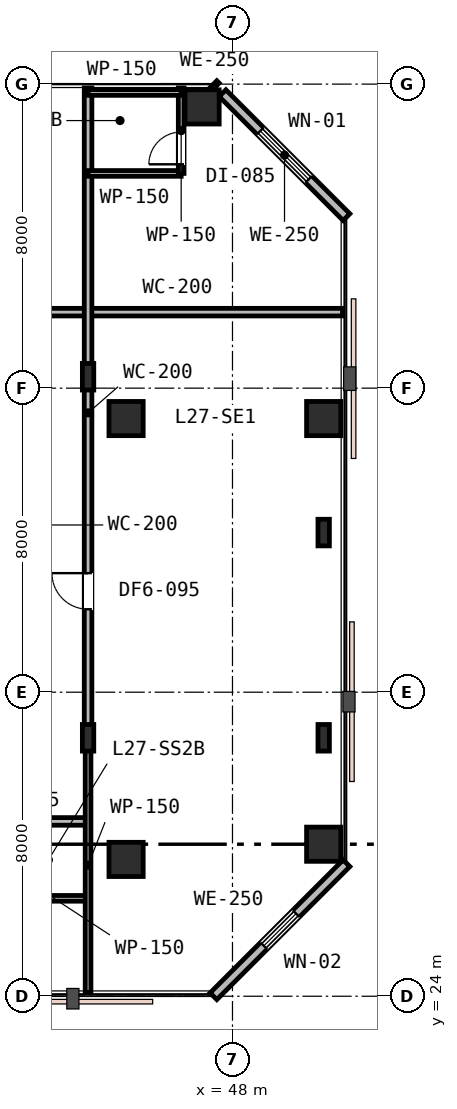
"""IFC4 building model, lengths in metres.
Left out: names, types, materials, properties, quantities, classifications, styles, units other than length and angle.
Written with IfcOpenShell. Run it as: python <this file> out.ifc"""

import sys

from ifc_helpers import new_model, si_unit, direction, frame, frame_2d, origin, origin_2d, place, context, subcontext, project, spatial, rectangle, i_section, extrude, element, fill, save


model = new_model("IFC4")
c1 = context("Model", 3, precision=1e-05, world=origin(), true_north=direction((0.0, 1.0)))
c2 = subcontext(c1, "Body", "Model", "MODEL_VIEW")
j1 = project(units=[si_unit("LENGTHUNIT", "METRE"), si_unit("PLANEANGLEUNIT", "RADIAN")], contexts=[c1])
p1 = place(None, origin())
s1 = spatial("IfcSite", under=j1, at=p1, CompositionType="ELEMENT")
p2 = place(p1, origin())
s2 = spatial("IfcBuilding", under=s1, at=p2, CompositionType="ELEMENT")
p3 = place(p2, frame((0.0, 0.0, 108.0)))
s3 = spatial("IfcBuildingStorey", under=s2, at=p3, CompositionType="ELEMENT", Elevation=108.0)
for number, where, z_axis, x_axis in (
    (1, (45.2, 27.6, 0.0), (0.0, 0.0, 1.0), (1.0, 0.0, 0.0)),
    (2, (45.2, 39.2, 0.0), (0.0, 0.0, 1.0), (1.0, 0.0, 0.0)),
    (3, (47.2, 47.4, 0.0), (0.0, 0.0, 1.0), (1.0, 0.0, 0.0)),
    (4, (50.4, 28.0, 0.0), (0.0, 0.0, 1.0), (1.0, 0.0, 0.0)),
    (5, (50.4, 39.2, 0.0), (0.0, 0.0, 1.0), (1.0, 0.0, 0.0)),
):
    element("IfcColumn", number, at=place(p3, frame(where, z_axis=z_axis, x_axis=x_axis)), inside=s3, PredefinedType="COLUMN", context=c2, shape_type="SweptSolid", body=[
        extrude(rectangle(XDim=0.9, YDim=0.9, at=origin_2d()), origin(), (0.0, 0.0, 1.0), 3.6),
    ])
for number, where, z_axis, x_axis in (
    (6, (44.2, 30.8, 0.0), (0.0, 0.0, 1.0), (1.0, 0.0, 0.0)),
    (7, (44.2, 40.3, 0.0), (0.0, 0.0, 1.0), (1.0, 0.0, 0.0)),
    (8, (50.4, 30.8, 0.0), (0.0, 0.0, 1.0), (1.0, 0.0, 0.0)),
    (9, (50.4, 36.2, 0.0), (0.0, 0.0, 1.0), (1.0, 0.0, 0.0)),
):
    element("IfcColumn", number, at=place(p3, frame(where, z_axis=z_axis, x_axis=x_axis)), inside=s3, PredefinedType="COLUMN", context=c2, shape_type="SweptSolid", body=[
        extrude(i_section(OverallWidth=0.3, OverallDepth=0.7, WebThickness=0.017, FlangeThickness=0.032, FilletRadius=0.027, at=origin_2d()), origin(), (0.0, 0.0, 1.0), 3.6),
    ])
p4 = place(p3, frame((47.5, 24.0, 0.0), z_axis=(0.0, 0.0, 1.0), x_axis=(0.707106781187, 0.707106781187, 0.0)))
e10 = element("IfcWall", 10, at=p4, inside=s3, PredefinedType="STANDARD", context=c2, shape_type="SweptSolid", body=[
    extrude(rectangle(XDim=4.95, YDim=0.25, at=frame_2d((2.475, 0.0))), origin(), (0.0, 0.0, 1.0), 3.33),
])
p5 = place(p4, frame((1.875, 0.0, 0.85)))
e11 = element("IfcOpeningElement", 11, at=p5, cuts=e10, PredefinedType="OPENING", context=c2, shape_type="SweptSolid", body=[
    extrude(rectangle(XDim=1.2, YDim=1.6, at=frame_2d((0.6, 0.8))), frame((0.0, 0.135, 0.0), z_axis=(0.0, -1.0, 0.0), x_axis=(1.0, 0.0, 0.0)), (0.0, 0.0, 1.0), 0.27),
])
p6 = place(p3, frame((51.0, 44.5, 0.0), z_axis=(0.0, 0.0, 1.0), x_axis=(-0.707106781187, 0.707106781187, 0.0)))
e12 = element("IfcWall", 12, at=p6, inside=s3, PredefinedType="STANDARD", context=c2, shape_type="SweptSolid", body=[
    extrude(rectangle(XDim=4.613, YDim=0.25, at=frame_2d((2.306, 0.0))), origin(), (0.0, 0.0, 1.0), 3.33),
])
p7 = place(p6, frame((1.406, 0.0, 0.75)))
e13 = element("IfcOpeningElement", 13, at=p7, cuts=e12, PredefinedType="OPENING", context=c2, shape_type="SweptSolid", body=[
    extrude(rectangle(XDim=1.8, YDim=1.85, at=frame_2d((0.9, 0.925))), frame((0.0, 0.135, 0.0), z_axis=(0.0, -1.0, 0.0), x_axis=(1.0, 0.0, 0.0)), (0.0, 0.0, 1.0), 0.27),
])
p8 = place(p3, frame((47.562, 47.938, 0.0), z_axis=(0.0, 0.0, 1.0), x_axis=(-0.707106781187, 0.707106781187, 0.0)))
e14 = element("IfcWall", 14, at=p8, inside=s3, PredefinedType="STANDARD", context=c2, shape_type="SweptSolid", body=[
    extrude(rectangle(XDim=0.087, YDim=0.25, at=frame_2d((0.044, 0.0))), origin(), (0.0, 0.0, 1.0), 3.33),
])
p9 = place(p3, frame((15.4, 28.6, 0.0), z_axis=(0.0, 0.0, 1.0), x_axis=(1.0, 0.0, 0.0)))
e15 = element("IfcWall", 15, at=p9, inside=s3, PredefinedType="PARTITIONING", context=c2, shape_type="SweptSolid", body=[
    extrude(rectangle(XDim=28.8, YDim=0.2, at=frame_2d((14.4, 0.0))), origin(), (0.0, 0.0, 1.0), 2.87),
])
p10 = place(p9, frame((12.41, 0.0, 0.0)))
e16 = element("IfcOpeningElement", 16, at=p10, cuts=e15, PredefinedType="OPENING", context=c2, shape_type="SweptSolid", body=[
    extrude(rectangle(XDim=0.95, YDim=2.15, at=frame_2d((0.475, 1.075))), frame((0.0, 0.11, 0.0), z_axis=(0.0, -1.0, 0.0), x_axis=(1.0, 0.0, 0.0)), (0.0, 0.0, 1.0), 0.22),
])
p11 = place(p9, frame((22.68, 0.0, 0.0)))
e17 = element("IfcOpeningElement", 17, at=p11, cuts=e15, PredefinedType="OPENING", context=c2, shape_type="SweptSolid", body=[
    extrude(rectangle(XDim=0.95, YDim=2.15, at=frame_2d((0.475, 1.075))), frame((0.0, 0.11, 0.0), z_axis=(0.0, -1.0, 0.0), x_axis=(1.0, 0.0, 0.0)), (0.0, 0.0, 1.0), 0.22),
])
p12 = place(p3, frame((42.2, 42.0, 0.0), z_axis=(0.0, 0.0, 1.0), x_axis=(1.0, 0.0, 0.0)))
e18 = element("IfcWall", 18, at=p12, inside=s3, PredefinedType="PARTITIONING", context=c2, shape_type="SweptSolid", body=[
    extrude(rectangle(XDim=8.7, YDim=0.2, at=frame_2d((4.35, 0.0))), origin(), (0.0, 0.0, 1.0), 3.33),
])
p13 = place(p3, frame((41.75, 26.576, 0.0), z_axis=(0.0, 0.0, 1.0), x_axis=(1.0, 0.0, 0.0)))
e19 = element("IfcWall", 19, at=p13, inside=s3, PredefinedType="PARTITIONING", context=c2, shape_type="SweptSolid", body=[
    extrude(rectangle(XDim=2.45, YDim=0.15, at=frame_2d((1.225, 0.0))), origin(), (0.0, 0.0, 1.0), 3.33),
])
p14 = place(p3, frame((44.2, 30.8, 0.0), z_axis=(0.0, 0.0, 1.0), x_axis=(0.0, -1.0, 0.0)))
e20 = element("IfcWall", 20, at=p14, inside=s3, PredefinedType="PARTITIONING", context=c2, shape_type="SweptSolid", body=[
    extrude(rectangle(XDim=6.7, YDim=0.15, at=frame_2d((3.35, 0.0))), origin(), (0.0, 0.0, 1.0), 2.87),
])
p15 = place(p3, frame((44.2, 30.8, 0.0), z_axis=(0.0, 0.0, 1.0), x_axis=(0.0, 1.0, 0.0)))
e21 = element("IfcWall", 21, at=p15, inside=s3, PredefinedType="PARTITIONING", context=c2, shape_type="SweptSolid", body=[
    extrude(rectangle(XDim=17.1, YDim=0.2, at=frame_2d((8.55, 0.0))), origin(), (0.0, 0.0, 1.0), 2.87),
])
p16 = place(p15, frame((3.382, 0.0, 0.0)))
e22 = element("IfcOpeningElement", 22, at=p16, cuts=e21, PredefinedType="OPENING", context=c2, shape_type="SweptSolid", body=[
    extrude(rectangle(XDim=0.95, YDim=2.15, at=frame_2d((0.475, 1.075))), frame((0.0, 0.11, 0.0), z_axis=(0.0, -1.0, 0.0), x_axis=(1.0, 0.0, 0.0)), (0.0, 0.0, 1.0), 0.22),
])
p17 = place(p3, frame((44.2, 45.65, 0.0), z_axis=(0.0, 0.0, 1.0), x_axis=(1.0, 0.0, 0.0)))
e23 = element("IfcWall", 23, at=p17, inside=s3, PredefinedType="PARTITIONING", context=c2, shape_type="SweptSolid", body=[
    extrude(rectangle(XDim=2.45, YDim=0.15, at=frame_2d((1.225, 0.0))), origin(), (0.0, 0.0, 1.0), 3.33),
])
p18 = place(p3, frame((46.65, 45.65, 0.0), z_axis=(0.0, 0.0, 1.0), x_axis=(0.0, 1.0, 0.0)))
e24 = element("IfcWall", 24, at=p18, inside=s3, PredefinedType="PARTITIONING", context=c2, shape_type="SweptSolid", body=[
    extrude(rectangle(XDim=2.25, YDim=0.15, at=frame_2d((1.125, 0.0))), origin(), (0.0, 0.0, 1.0), 2.96),
])
p19 = place(p18, frame((0.24, 0.0, 0.0)))
e25 = element("IfcOpeningElement", 25, at=p19, cuts=e24, PredefinedType="OPENING", context=c2, shape_type="SweptSolid", body=[
    extrude(rectangle(XDim=0.85, YDim=2.15, at=frame_2d((0.425, 1.075))), frame((0.0, 0.085, 0.0), z_axis=(0.0, -1.0, 0.0), x_axis=(1.0, 0.0, 0.0)), (0.0, 0.0, 1.0), 0.17),
])
p20 = place(p3, frame((44.2, 47.78, 0.0), z_axis=(0.0, 0.0, 1.0), x_axis=(1.0, 0.0, 0.0)))
e26 = element("IfcWall", 26, at=p20, inside=s3, PredefinedType="PARTITIONING", context=c2, shape_type="SweptSolid", body=[
    extrude(rectangle(XDim=2.45, YDim=0.15, at=frame_2d((1.225, 0.0))), origin(), (0.0, 0.0, 1.0), 2.96),
])
p21 = place(p5, origin())
e27 = element("IfcWindow", 27, at=p21, inside=s3, PartitioningType="SINGLE_PANEL", PredefinedType="WINDOW", context=c2, shape_type="SweptSolid", body=[
    extrude(rectangle(XDim=1.2, YDim=1.6, at=frame_2d((0.6, 0.8))), frame((0.0, 0.03, 0.0), z_axis=(0.0, -1.0, 0.0), x_axis=(1.0, 0.0, 0.0)), (0.0, 0.0, 1.0), 0.06),
])
fill(e11, e27)
p22 = place(p7, origin())
e28 = element("IfcWindow", 28, at=p22, inside=s3, PartitioningType="SINGLE_PANEL", PredefinedType="WINDOW", context=c2, shape_type="SweptSolid", body=[
    extrude(rectangle(XDim=1.8, YDim=1.85, at=frame_2d((0.9, 0.925))), frame((0.0, 0.03, 0.0), z_axis=(0.0, -1.0, 0.0), x_axis=(1.0, 0.0, 0.0)), (0.0, 0.0, 1.0), 0.06),
])
fill(e13, e28)
p23 = place(p16, origin())
e29 = element("IfcDoor", 29, at=p23, inside=s3, OperationType="SINGLE_SWING_RIGHT", PredefinedType="DOOR", context=c2, shape_type="SweptSolid", body=[
    extrude(rectangle(XDim=0.95, YDim=2.15, at=frame_2d((0.475, 1.075))), frame((0.0, 0.025, 0.0), z_axis=(0.0, -1.0, 0.0), x_axis=(1.0, 0.0, 0.0)), (0.0, 0.0, 1.0), 0.05),
])
fill(e22, e29)
p24 = place(p19, origin())
e30 = element("IfcDoor", 30, at=p24, inside=s3, OperationType="SINGLE_SWING_LEFT", PredefinedType="DOOR", context=c2, shape_type="SweptSolid", body=[
    extrude(rectangle(XDim=0.85, YDim=2.15, at=frame_2d((0.425, 1.075))), frame((0.0, 0.025, 0.0), z_axis=(0.0, -1.0, 0.0), x_axis=(1.0, 0.0, 0.0)), (0.0, 0.0, 1.0), 0.05),
])
fill(e25, e30)
save(model, sys.argv[1])
